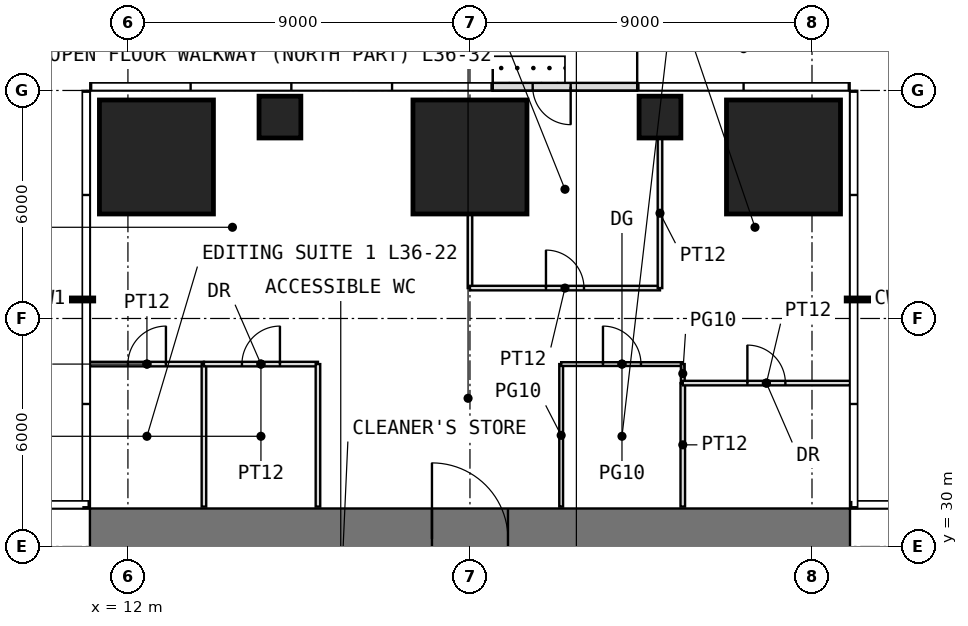
"""IFC4 building model, lengths in metres.
Left out: names, types, materials, properties, quantities, classifications, styles, units other than length and angle.
Written with IfcOpenShell. Run it as: python <this file> out.ifc"""

import sys

from ifc_helpers import new_model, si_unit, direction, frame, frame_2d, origin, origin_2d, place, context, subcontext, project, spatial, rectangle, extrude, element, fill, save


model = new_model("IFC4")
c1 = context("Model", 3, precision=1e-05, world=origin(), true_north=direction((0.0, 1.0)))
c2 = subcontext(c1, "Body", "Model", "MODEL_VIEW")
j1 = project(units=[si_unit("LENGTHUNIT", "METRE"), si_unit("PLANEANGLEUNIT", "RADIAN")], contexts=[c1])
p1 = place(None, origin())
s1 = spatial("IfcSite", under=j1, at=p1, CompositionType="ELEMENT")
p2 = place(p1, origin())
s2 = spatial("IfcBuilding", under=s1, at=p2, CompositionType="ELEMENT")
p3 = place(p2, frame((0.0, 0.0, 152.5)))
s3 = spatial("IfcBuildingStorey", under=s2, at=p3, CompositionType="ELEMENT", Elevation=152.5)
p4 = place(p3, frame((12.75, 40.25, 0.0), z_axis=(0.0, 0.0, 1.0), x_axis=(1.0, 0.0, 0.0)))
e1 = element("IfcColumn", 1, at=p4, inside=s3, PredefinedType="COLUMN", context=c2, shape_type="SweptSolid", body=[
    extrude(rectangle(XDim=3.0, YDim=3.0, at=origin_2d()), origin(), (0.0, 0.0, 1.0), 4.0),
])
p5 = place(p3, frame((16.0, 41.3, 0.0), z_axis=(0.0, 0.0, 1.0), x_axis=(1.0, 0.0, 0.0)))
e2 = element("IfcColumn", 2, at=p5, inside=s3, PredefinedType="COLUMN", context=c2, shape_type="SweptSolid", body=[
    extrude(rectangle(XDim=1.1, YDim=1.1, at=origin_2d()), origin(), (0.0, 0.0, 1.0), 4.0),
])
p6 = place(p3, frame((21.0, 40.25, 0.0), z_axis=(0.0, 0.0, 1.0), x_axis=(1.0, 0.0, 0.0)))
e3 = element("IfcColumn", 3, at=p6, inside=s3, PredefinedType="COLUMN", context=c2, shape_type="SweptSolid", body=[
    extrude(rectangle(XDim=3.0, YDim=3.0, at=origin_2d()), origin(), (0.0, 0.0, 1.0), 4.0),
])
p7 = place(p3, frame((26.0, 41.3, 0.0), z_axis=(0.0, 0.0, 1.0), x_axis=(1.0, 0.0, 0.0)))
e4 = element("IfcColumn", 4, at=p7, inside=s3, PredefinedType="COLUMN", context=c2, shape_type="SweptSolid", body=[
    extrude(rectangle(XDim=1.1, YDim=1.1, at=origin_2d()), origin(), (0.0, 0.0, 1.0), 4.0),
])
p8 = place(p3, frame((29.25, 40.25, 0.0), z_axis=(0.0, 0.0, 1.0), x_axis=(1.0, 0.0, 0.0)))
e5 = element("IfcColumn", 5, at=p8, inside=s3, PredefinedType="COLUMN", context=c2, shape_type="SweptSolid", body=[
    extrude(rectangle(XDim=3.0, YDim=3.0, at=origin_2d()), origin(), (0.0, 0.0, 1.0), 4.0),
])
p9 = place(p3, frame((25.4, 42.1, 0.0), z_axis=(0.0, 0.0, 1.0), x_axis=(-1.0, 0.0, 0.0)))
e6 = element("IfcWall", 6, at=p9, inside=s3, PredefinedType="USERDEFINED", context=c2, shape_type="SweptSolid", body=[
    extrude(rectangle(XDim=3.8, YDim=0.2, at=frame_2d((1.9, 0.0))), origin(), (0.0, 0.0, 1.0), 3.75),
])
p10 = place(p9, frame((1.75, 0.0, 0.0)))
e7 = element("IfcOpeningElement", 7, at=p10, cuts=e6, PredefinedType="OPENING", context=c2, shape_type="SweptSolid", body=[
    extrude(rectangle(XDim=1.0, YDim=2.4, at=frame_2d((0.5, 1.2))), frame((0.0, 0.11, 0.0), z_axis=(0.0, -1.0, 0.0), x_axis=(1.0, 0.0, 0.0)), (0.0, 0.0, 1.0), 0.22),
])
p11 = place(p3, frame((11.0, 30.2, -0.05), z_axis=(0.0, 0.0, 1.0), x_axis=(1.0, 0.0, 0.0)))
e8 = element("IfcWall", 8, at=p11, inside=s3, PredefinedType="SHEAR", context=c2, shape_type="SweptSolid", body=[
    extrude(rectangle(XDim=20.0, YDim=1.6, at=frame_2d((10.0, 0.0))), origin(), (0.0, 0.0, 1.0), 4.0),
])
p12 = place(p11, frame((9.0, 0.0, 0.05)))
e9 = element("IfcOpeningElement", 9, at=p12, cuts=e8, PredefinedType="OPENING", context=c2, shape_type="SweptSolid", body=[
    extrude(rectangle(XDim=2.0, YDim=2.2, at=frame_2d((1.0, 1.1))), frame((0.0, 0.81, 0.0), z_axis=(0.0, -1.0, 0.0), x_axis=(1.0, 0.0, 0.0)), (0.0, 0.0, 1.0), 1.62),
])
p13 = place(p3, frame((11.0, 34.8, 0.0), z_axis=(0.0, 0.0, 1.0), x_axis=(1.0, 0.0, 0.0)))
e10 = element("IfcWall", 10, at=p13, inside=s3, PredefinedType="PARTITIONING", context=c2, shape_type="SweptSolid", body=[
    extrude(rectangle(XDim=3.0, YDim=0.12, at=frame_2d((1.5, 0.0))), origin(), (0.0, 0.0, 1.0), 3.75),
])
p14 = place(p13, frame((1.0, 0.0, 0.0)))
e11 = element("IfcOpeningElement", 11, at=p14, cuts=e10, PredefinedType="OPENING", context=c2, shape_type="SweptSolid", body=[
    extrude(rectangle(XDim=1.0, YDim=2.2, at=frame_2d((0.5, 1.1))), frame((0.0, 0.07, 0.0), z_axis=(0.0, -1.0, 0.0), x_axis=(1.0, 0.0, 0.0)), (0.0, 0.0, 1.0), 0.14),
])
p15 = place(p3, frame((14.0, 31.05, 0.0), z_axis=(0.0, 0.0, 1.0), x_axis=(0.0, 1.0, 0.0)))
e12 = element("IfcWall", 12, at=p15, inside=s3, PredefinedType="PARTITIONING", context=c2, shape_type="SweptSolid", body=[
    extrude(rectangle(XDim=3.75, YDim=0.12, at=frame_2d((1.875, 0.0))), origin(), (0.0, 0.0, 1.0), 3.75),
])
p16 = place(p3, frame((14.0, 34.8, 0.0), z_axis=(0.0, 0.0, 1.0), x_axis=(1.0, 0.0, 0.0)))
e13 = element("IfcWall", 13, at=p16, inside=s3, PredefinedType="PARTITIONING", context=c2, shape_type="SweptSolid", body=[
    extrude(rectangle(XDim=3.0, YDim=0.12, at=frame_2d((1.5, 0.0))), origin(), (0.0, 0.0, 1.0), 3.75),
])
p17 = place(p16, frame((1.0, 0.0, 0.0)))
e14 = element("IfcOpeningElement", 14, at=p17, cuts=e13, PredefinedType="OPENING", context=c2, shape_type="SweptSolid", body=[
    extrude(rectangle(XDim=1.0, YDim=2.2, at=frame_2d((0.5, 1.1))), frame((0.0, 0.07, 0.0), z_axis=(0.0, -1.0, 0.0), x_axis=(1.0, 0.0, 0.0)), (0.0, 0.0, 1.0), 0.14),
])
p18 = place(p3, frame((17.0, 31.05, 0.0), z_axis=(0.0, 0.0, 1.0), x_axis=(0.0, 1.0, 0.0)))
e15 = element("IfcWall", 15, at=p18, inside=s3, PredefinedType="PARTITIONING", context=c2, shape_type="SweptSolid", body=[
    extrude(rectangle(XDim=3.75, YDim=0.12, at=frame_2d((1.875, 0.0))), origin(), (0.0, 0.0, 1.0), 3.75),
])
p19 = place(p3, frame((21.0, 36.8, 0.0), z_axis=(0.0, 0.0, 1.0), x_axis=(0.0, 1.0, 0.0)))
e16 = element("IfcWall", 16, at=p19, inside=s3, PredefinedType="PARTITIONING", context=c2, shape_type="SweptSolid", body=[
    extrude(rectangle(XDim=1.94, YDim=0.12, at=frame_2d((0.97, 0.0))), origin(), (0.0, 0.0, 1.0), 3.75),
])
p20 = place(p3, frame((21.0, 36.8, 0.0), z_axis=(0.0, 0.0, 1.0), x_axis=(1.0, 0.0, 0.0)))
e17 = element("IfcWall", 17, at=p20, inside=s3, PredefinedType="PARTITIONING", context=c2, shape_type="SweptSolid", body=[
    extrude(rectangle(XDim=5.0, YDim=0.12, at=frame_2d((2.5, 0.0))), origin(), (0.0, 0.0, 1.0), 3.75),
])
p21 = place(p20, frame((2.0, 0.0, 0.0)))
e18 = element("IfcOpeningElement", 18, at=p21, cuts=e17, PredefinedType="OPENING", context=c2, shape_type="SweptSolid", body=[
    extrude(rectangle(XDim=1.0, YDim=2.2, at=frame_2d((0.5, 1.1))), frame((0.0, 0.07, 0.0), z_axis=(0.0, -1.0, 0.0), x_axis=(1.0, 0.0, 0.0)), (0.0, 0.0, 1.0), 0.14),
])
p22 = place(p3, frame((23.4, 31.05, 0.0), z_axis=(0.0, 0.0, 1.0), x_axis=(0.0, 1.0, 0.0)))
e19 = element("IfcWall", 19, at=p22, inside=s3, PredefinedType="PARTITIONING", context=c2, shape_type="SweptSolid", body=[
    extrude(rectangle(XDim=3.75, YDim=0.1, at=frame_2d((1.875, 0.0))), origin(), (0.0, 0.0, 1.0), 3.75),
])
p23 = place(p3, frame((23.4, 34.8, 0.0), z_axis=(0.0, 0.0, 1.0), x_axis=(1.0, 0.0, 0.0)))
e20 = element("IfcWall", 20, at=p23, inside=s3, PredefinedType="PARTITIONING", context=c2, shape_type="SweptSolid", body=[
    extrude(rectangle(XDim=3.2, YDim=0.1, at=frame_2d((1.6, 0.0))), origin(), (0.0, 0.0, 1.0), 3.75),
])
p24 = place(p23, frame((1.1, 0.0, 0.0)))
e21 = element("IfcOpeningElement", 21, at=p24, cuts=e20, PredefinedType="OPENING", context=c2, shape_type="SweptSolid", body=[
    extrude(rectangle(XDim=1.0, YDim=2.4, at=frame_2d((0.5, 1.2))), frame((0.0, 0.06, 0.0), z_axis=(0.0, -1.0, 0.0), x_axis=(1.0, 0.0, 0.0)), (0.0, 0.0, 1.0), 0.12),
])
p25 = place(p3, frame((26.0, 36.8, 0.0), z_axis=(0.0, 0.0, 1.0), x_axis=(0.0, 1.0, 0.0)))
e22 = element("IfcWall", 22, at=p25, inside=s3, PredefinedType="PARTITIONING", context=c2, shape_type="SweptSolid", body=[
    extrude(rectangle(XDim=3.94, YDim=0.12, at=frame_2d((1.97, 0.0))), origin(), (0.0, 0.0, 1.0), 3.75),
])
p26 = place(p3, frame((26.6, 31.05, 0.0), z_axis=(0.0, 0.0, 1.0), x_axis=(0.0, 1.0, 0.0)))
e23 = element("IfcWall", 23, at=p26, inside=s3, PredefinedType="PARTITIONING", context=c2, shape_type="SweptSolid", body=[
    extrude(rectangle(XDim=3.25, YDim=0.12, at=frame_2d((1.625, 0.0))), origin(), (0.0, 0.0, 1.0), 3.75),
])
p27 = place(p3, frame((26.6, 34.3, 0.0), z_axis=(0.0, 0.0, 1.0), x_axis=(0.0, 1.0, 0.0)))
e24 = element("IfcWall", 24, at=p27, inside=s3, PredefinedType="PARTITIONING", context=c2, shape_type="SweptSolid", body=[
    extrude(rectangle(XDim=0.5, YDim=0.1, at=frame_2d((0.25, 0.0))), origin(), (0.0, 0.0, 1.0), 3.75),
])
p28 = place(p3, frame((26.6, 34.3, 0.0), z_axis=(0.0, 0.0, 1.0), x_axis=(1.0, 0.0, 0.0)))
e25 = element("IfcWall", 25, at=p28, inside=s3, PredefinedType="PARTITIONING", context=c2, shape_type="SweptSolid", body=[
    extrude(rectangle(XDim=4.4, YDim=0.12, at=frame_2d((2.2, 0.0))), origin(), (0.0, 0.0, 1.0), 3.75),
])
p29 = place(p28, frame((1.7, 0.0, 0.0)))
e26 = element("IfcOpeningElement", 26, at=p29, cuts=e25, PredefinedType="OPENING", context=c2, shape_type="SweptSolid", body=[
    extrude(rectangle(XDim=1.0, YDim=2.2, at=frame_2d((0.5, 1.1))), frame((0.0, 0.07, 0.0), z_axis=(0.0, -1.0, 0.0), x_axis=(1.0, 0.0, 0.0)), (0.0, 0.0, 1.0), 0.14),
])
p30 = place(p10, origin())
e27 = element("IfcDoor", 27, at=p30, inside=s3, OperationType="SINGLE_SWING_LEFT", PredefinedType="DOOR", context=c2, shape_type="SweptSolid", body=[
    extrude(rectangle(XDim=1.0, YDim=2.4, at=frame_2d((0.5, 1.2))), frame((0.0, 0.025, 0.0), z_axis=(0.0, -1.0, 0.0), x_axis=(1.0, 0.0, 0.0)), (0.0, 0.0, 1.0), 0.05),
])
fill(e7, e27)
p31 = place(p12, origin())
e28 = element("IfcDoor", 28, at=p31, inside=s3, OperationType="DOUBLE_DOOR_SINGLE_SWING", PredefinedType="DOOR", context=c2, shape_type="SweptSolid", body=[
    extrude(rectangle(XDim=2.0, YDim=2.2, at=frame_2d((1.0, 1.1))), frame((0.0, 0.025, 0.0), z_axis=(0.0, -1.0, 0.0), x_axis=(1.0, 0.0, 0.0)), (0.0, 0.0, 1.0), 0.05),
])
fill(e9, e28)
p32 = place(p14, origin())
e29 = element("IfcDoor", 29, at=p32, inside=s3, OperationType="SINGLE_SWING_RIGHT", PredefinedType="DOOR", context=c2, shape_type="SweptSolid", body=[
    extrude(rectangle(XDim=1.0, YDim=2.2, at=frame_2d((0.5, 1.1))), frame((0.0, 0.025, 0.0), z_axis=(0.0, -1.0, 0.0), x_axis=(1.0, 0.0, 0.0)), (0.0, 0.0, 1.0), 0.05),
])
fill(e11, e29)
p33 = place(p17, origin())
e30 = element("IfcDoor", 30, at=p33, inside=s3, OperationType="SINGLE_SWING_RIGHT", PredefinedType="DOOR", context=c2, shape_type="SweptSolid", body=[
    extrude(rectangle(XDim=1.0, YDim=2.2, at=frame_2d((0.5, 1.1))), frame((0.0, 0.025, 0.0), z_axis=(0.0, -1.0, 0.0), x_axis=(1.0, 0.0, 0.0)), (0.0, 0.0, 1.0), 0.05),
])
fill(e14, e30)
p34 = place(p24, origin())
e31 = element("IfcDoor", 31, at=p34, inside=s3, OperationType="SINGLE_SWING_LEFT", PredefinedType="DOOR", context=c2, shape_type="SweptSolid", body=[
    extrude(rectangle(XDim=1.0, YDim=2.4, at=frame_2d((0.5, 1.2))), frame((0.0, 0.025, 0.0), z_axis=(0.0, -1.0, 0.0), x_axis=(1.0, 0.0, 0.0)), (0.0, 0.0, 1.0), 0.05),
])
fill(e21, e31)
p35 = place(p29, origin())
e32 = element("IfcDoor", 32, at=p35, inside=s3, OperationType="SINGLE_SWING_LEFT", PredefinedType="DOOR", context=c2, shape_type="SweptSolid", body=[
    extrude(rectangle(XDim=1.0, YDim=2.2, at=frame_2d((0.5, 1.1))), frame((0.0, 0.025, 0.0), z_axis=(0.0, -1.0, 0.0), x_axis=(1.0, 0.0, 0.0)), (0.0, 0.0, 1.0), 0.05),
])
fill(e26, e32)
p36 = place(p21, origin())
e33 = element("IfcDoor", 33, at=p36, inside=s3, OperationType="SINGLE_SWING_LEFT", PredefinedType="DOOR", context=c2, shape_type="SweptSolid", body=[
    extrude(rectangle(XDim=1.0, YDim=2.2, at=frame_2d((0.5, 1.1))), frame((0.0, 0.025, 0.0), z_axis=(0.0, -1.0, 0.0), x_axis=(1.0, 0.0, 0.0)), (0.0, 0.0, 1.0), 0.05),
])
fill(e18, e33)
save(model, sys.argv[1])
